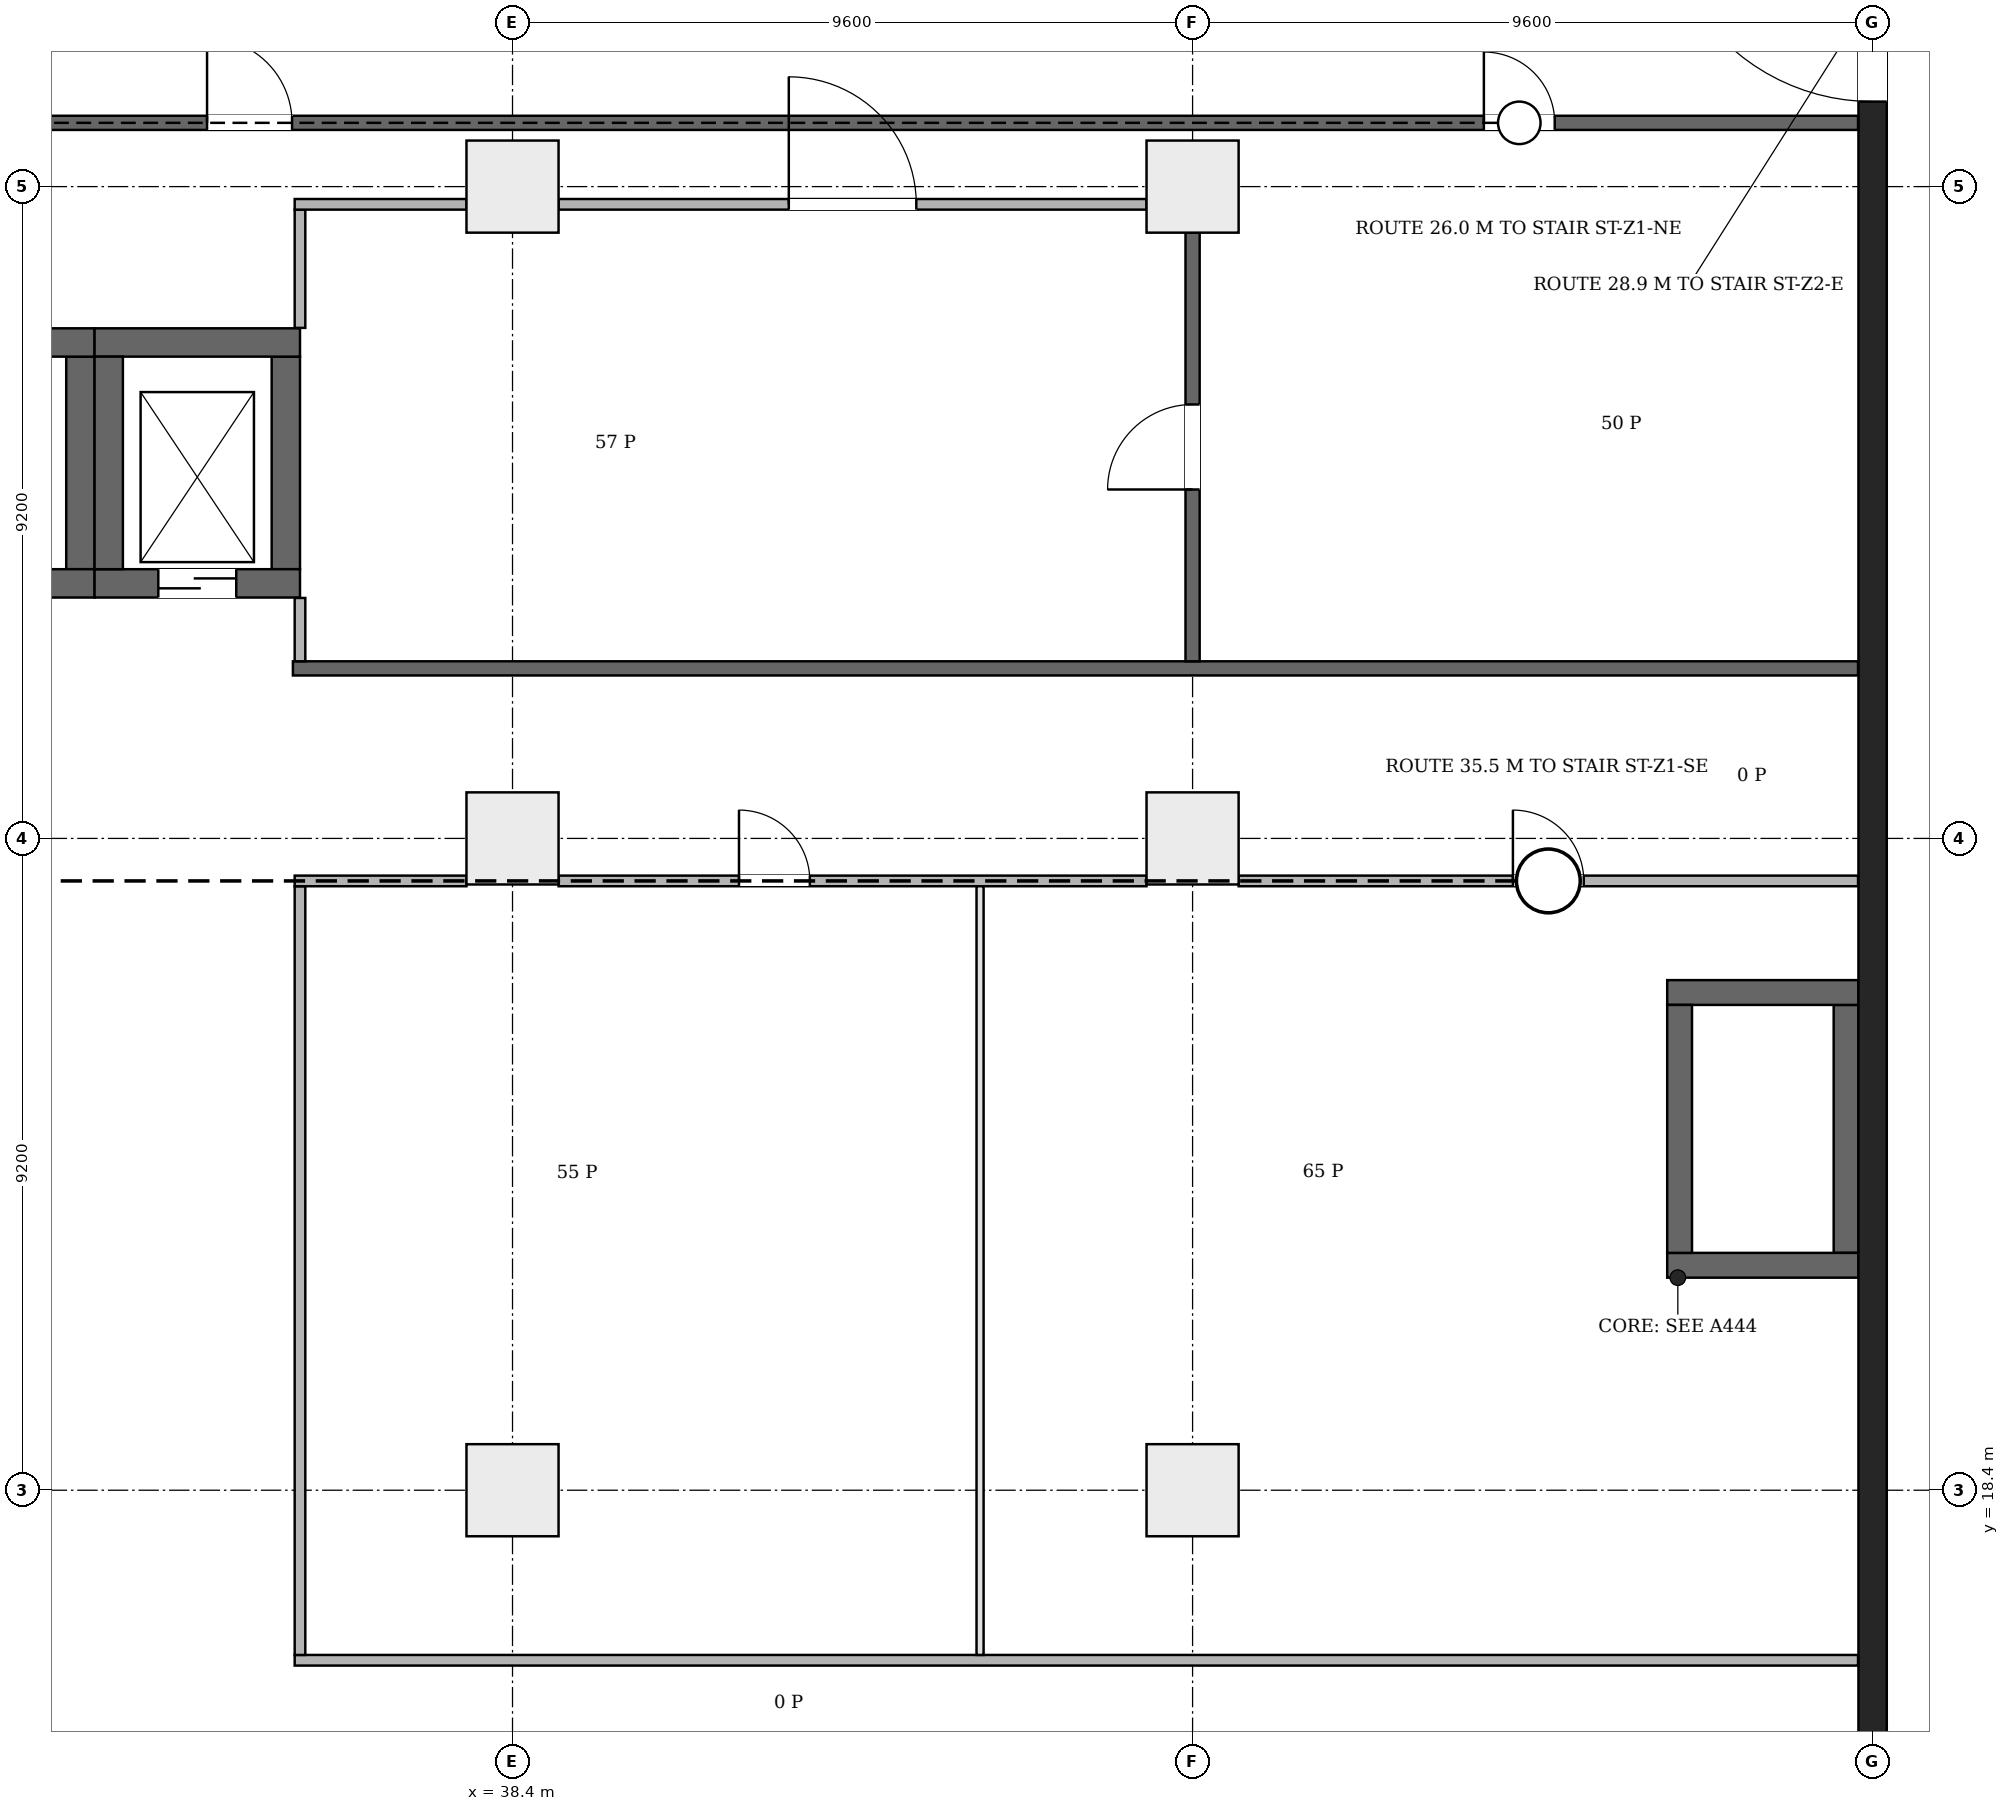
"""IFC4 building model, lengths in metres.
Left out: names, types, materials, properties, quantities, classifications, styles, units other than length and angle.
Written with IfcOpenShell. Run it as: python <this file> out.ifc"""

import sys

from ifc_helpers import new_model, si_unit, direction, frame, frame_2d, origin, origin_2d, place, context, subcontext, project, spatial, rectangle, extrude, element, fill, save


model = new_model("IFC4")
c1 = context("Model", 3, precision=1e-05, world=origin(), true_north=direction((0.0, 1.0)))
c2 = subcontext(c1, "Body", "Model", "MODEL_VIEW")
j1 = project(units=[si_unit("LENGTHUNIT", "METRE"), si_unit("PLANEANGLEUNIT", "RADIAN")], contexts=[c1])
p1 = place(None, origin())
s1 = spatial("IfcSite", under=j1, at=p1, CompositionType="ELEMENT")
p2 = place(p1, origin())
s2 = spatial("IfcBuilding", under=s1, at=p2, CompositionType="ELEMENT")
p3 = place(p2, origin())
s3 = spatial("IfcBuildingStorey", under=s2, at=p3, CompositionType="ELEMENT", Elevation=0.0)
p4 = place(p3, frame((57.6, -0.2, 0.0), z_axis=(0.0, 0.0, 1.0), x_axis=(0.0, 1.0, 0.0)))
e1 = element("IfcWall", 1, at=p4, inside=s3, PredefinedType="SHEAR", context=c2, shape_type="SweptSolid", body=[
    extrude(rectangle(XDim=46.88, YDim=0.4, at=frame_2d((23.44, 0.0))), origin(), (0.0, 0.0, 1.0), 6.5),
])
p5 = place(p4, frame((11.65, 0.0, 0.0)))
e2 = element("IfcOpeningElement", 2, at=p5, cuts=e1, PredefinedType="OPENING", context=c2, shape_type="SweptSolid", body=[
    extrude(rectangle(XDim=3.0, YDim=2.4, at=frame_2d((1.5, 1.2))), frame((0.0, 0.21, 0.0), z_axis=(0.0, -1.0, 0.0), x_axis=(1.0, 0.0, 0.0)), (0.0, 0.0, 1.0), 0.42),
])
p6 = place(p4, frame((38.2, 0.0, 0.0)))
e3 = element("IfcOpeningElement", 3, at=p6, cuts=e1, PredefinedType="OPENING", context=c2, shape_type="SweptSolid", body=[
    extrude(rectangle(XDim=3.0, YDim=2.4, at=frame_2d((1.5, 1.2))), frame((0.0, 0.21, 0.0), z_axis=(0.0, -1.0, 0.0), x_axis=(1.0, 0.0, 0.0)), (0.0, 0.0, 1.0), 0.42),
])
for number, where, z_axis, x_axis in (
    (4, (54.7, 21.575, 0.0), (0.0, 0.0, 1.0), (1.0, 0.0, 0.0)),
    (5, (54.7, 25.425, 0.0), (0.0, 0.0, 1.0), (1.0, 0.0, 0.0)),
):
    element("IfcWall", number, at=place(p3, frame(where, z_axis=z_axis, x_axis=x_axis)), inside=s3, PredefinedType="SHEAR", context=c2, shape_type="SweptSolid", body=[
        extrude(rectangle(XDim=2.7, YDim=0.35, at=frame_2d((1.35, 0.0))), origin(), (0.0, 0.0, 1.0), 6.5),
    ])
for number, where, z_axis, x_axis in (
    (6, (54.875, 21.75, 0.0), (0.0, 0.0, 1.0), (0.0, 1.0, 0.0)),
    (7, (57.225, 21.75, 0.0), (0.0, 0.0, 1.0), (0.0, 1.0, 0.0)),
):
    element("IfcWall", number, at=place(p3, frame(where, z_axis=z_axis, x_axis=x_axis)), inside=s3, PredefinedType="SHEAR", context=c2, shape_type="SweptSolid", body=[
        extrude(rectangle(XDim=3.5, YDim=0.35, at=frame_2d((1.75, 0.0))), origin(), (0.0, 0.0, 1.0), 6.5),
    ])
p7 = place(p3, frame((29.6, 31.2, 0.0), z_axis=(0.0, 0.0, 1.0), x_axis=(1.0, 0.0, 0.0)))
e8 = element("IfcWall", 8, at=p7, inside=s3, PredefinedType="SHEAR", context=c2, shape_type="SweptSolid", body=[
    extrude(rectangle(XDim=2.9, YDim=0.4, at=frame_2d((1.45, 0.0))), origin(), (0.0, 0.0, 1.0), 6.5),
])
p8 = place(p7, frame((0.9, 0.0, 0.0)))
e9 = element("IfcOpeningElement", 9, at=p8, cuts=e8, PredefinedType="OPENING", context=c2, shape_type="SweptSolid", body=[
    extrude(rectangle(XDim=1.1, YDim=2.1, at=frame_2d((0.55, 1.05))), frame((0.0, 0.21, 0.0), z_axis=(0.0, -1.0, 0.0), x_axis=(1.0, 0.0, 0.0)), (0.0, 0.0, 1.0), 0.42),
])
p9 = place(p3, frame((29.6, 34.6, 0.0), z_axis=(0.0, 0.0, 1.0), x_axis=(1.0, 0.0, 0.0)))
e10 = element("IfcWall", 10, at=p9, inside=s3, PredefinedType="SHEAR", context=c2, shape_type="SweptSolid", body=[
    extrude(rectangle(XDim=2.9, YDim=0.4, at=frame_2d((1.45, 0.0))), origin(), (0.0, 0.0, 1.0), 6.5),
])
p10 = place(p3, frame((32.3, 31.4, 0.0), z_axis=(0.0, 0.0, 1.0), x_axis=(0.0, 1.0, 0.0)))
e11 = element("IfcWall", 11, at=p10, inside=s3, PredefinedType="SHEAR", context=c2, shape_type="SweptSolid", body=[
    extrude(rectangle(XDim=3.0, YDim=0.4, at=frame_2d((1.5, 0.0))), origin(), (0.0, 0.0, 1.0), 6.5),
])
p11 = place(p3, frame((32.5, 31.2, 0.0), z_axis=(0.0, 0.0, 1.0), x_axis=(1.0, 0.0, 0.0)))
e12 = element("IfcWall", 12, at=p11, inside=s3, PredefinedType="SHEAR", context=c2, shape_type="SweptSolid", body=[
    extrude(rectangle(XDim=2.9, YDim=0.4, at=frame_2d((1.45, 0.0))), origin(), (0.0, 0.0, 1.0), 6.5),
])
p12 = place(p11, frame((0.9, 0.0, 0.0)))
e13 = element("IfcOpeningElement", 13, at=p12, cuts=e12, PredefinedType="OPENING", context=c2, shape_type="SweptSolid", body=[
    extrude(rectangle(XDim=1.1, YDim=2.1, at=frame_2d((0.55, 1.05))), frame((0.0, 0.21, 0.0), z_axis=(0.0, -1.0, 0.0), x_axis=(1.0, 0.0, 0.0)), (0.0, 0.0, 1.0), 0.42),
])
p13 = place(p3, frame((32.5, 34.6, 0.0), z_axis=(0.0, 0.0, 1.0), x_axis=(1.0, 0.0, 0.0)))
e14 = element("IfcWall", 14, at=p13, inside=s3, PredefinedType="SHEAR", context=c2, shape_type="SweptSolid", body=[
    extrude(rectangle(XDim=2.9, YDim=0.4, at=frame_2d((1.45, 0.0))), origin(), (0.0, 0.0, 1.0), 6.5),
])
for number, where, z_axis, x_axis in (
    (15, (32.7, 31.4, 0.0), (0.0, 0.0, 1.0), (0.0, 1.0, 0.0)),
    (16, (35.2, 31.4, 0.0), (0.0, 0.0, 1.0), (0.0, 1.0, 0.0)),
):
    element("IfcWall", number, at=place(p3, frame(where, z_axis=z_axis, x_axis=x_axis)), inside=s3, PredefinedType="SHEAR", context=c2, shape_type="SweptSolid", body=[
        extrude(rectangle(XDim=3.0, YDim=0.4, at=frame_2d((1.5, 0.0))), origin(), (0.0, 0.0, 1.0), 6.5),
    ])
for number, where, z_axis, x_axis in (
    (17, (38.4, 18.4, 0.0), (0.0, 0.0, 1.0), (1.0, 0.0, 0.0)),
    (18, (48.0, 18.4, 0.0), (0.0, 0.0, 1.0), (1.0, 0.0, 0.0)),
    (19, (38.4, 27.6, 0.0), (0.0, 0.0, 1.0), (1.0, 0.0, 0.0)),
    (20, (48.0, 27.6, 0.0), (0.0, 0.0, 1.0), (1.0, 0.0, 0.0)),
    (21, (38.4, 36.8, 0.0), (0.0, 0.0, 1.0), (1.0, 0.0, 0.0)),
    (22, (48.0, 36.8, 0.0), (0.0, 0.0, 1.0), (1.0, 0.0, 0.0)),
):
    element("IfcColumn", number, at=place(p3, frame(where, z_axis=z_axis, x_axis=x_axis)), inside=s3, PredefinedType="COLUMN", context=c2, shape_type="SweptSolid", body=[
        extrude(rectangle(XDim=1.3, YDim=1.3, at=origin_2d()), origin(), (0.0, 0.0, 1.0), 6.5),
    ])
p14 = place(p3, frame((28.006, 37.7, 0.0), z_axis=(0.0, 0.0, 1.0), x_axis=(1.0, 0.0, 0.0)))
e23 = element("IfcWall", 23, at=p14, inside=s3, PredefinedType="PARTITIONING", context=c2, shape_type="SweptSolid", body=[
    extrude(rectangle(XDim=29.388, YDim=0.2, at=frame_2d((14.694, 0.0))), origin(), (0.0, 0.0, 1.0), 6.15),
])
p15 = place(p14, frame((24.106, 0.0, 0.0)))
e24 = element("IfcOpeningElement", 24, at=p15, cuts=e23, PredefinedType="OPENING", context=c2, shape_type="SweptSolid", body=[
    extrude(rectangle(XDim=1.0, YDim=2.1, at=frame_2d((0.5, 1.05))), frame((0.0, 0.11, 0.0), z_axis=(0.0, -1.0, 0.0), x_axis=(1.0, 0.0, 0.0)), (0.0, 0.0, 1.0), 0.22),
])
p16 = place(p14, frame((6.082, 0.0, 0.0)))
e25 = element("IfcOpeningElement", 25, at=p16, cuts=e23, PredefinedType="OPENING", context=c2, shape_type="SweptSolid", body=[
    extrude(rectangle(XDim=1.2, YDim=2.1, at=frame_2d((0.6, 1.05))), frame((0.0, 0.11, 0.0), z_axis=(0.0, -1.0, 0.0), x_axis=(1.0, 0.0, 0.0)), (0.0, 0.0, 1.0), 0.22),
])
p17 = place(p3, frame((35.3, 30.0, 0.0), z_axis=(0.0, 0.0, 1.0), x_axis=(1.0, 0.0, 0.0)))
e26 = element("IfcWall", 26, at=p17, inside=s3, PredefinedType="PARTITIONING", context=c2, shape_type="SweptSolid", body=[
    extrude(rectangle(XDim=22.094, YDim=0.2, at=frame_2d((11.047, 0.0))), origin(), (0.0, 0.0, 1.0), 6.15),
])
p18 = place(p3, frame((35.325, 16.0, 0.0), z_axis=(0.0, 0.0, 1.0), x_axis=(1.0, 0.0, 0.0)))
e27 = element("IfcWall", 27, at=p18, inside=s3, PredefinedType="PARTITIONING", context=c2, shape_type="SweptSolid", body=[
    extrude(rectangle(XDim=22.069, YDim=0.15, at=frame_2d((11.035, 0.0))), origin(), (0.0, 0.0, 1.0), 6.15),
])
p19 = place(p3, frame((35.4, 16.075, 0.0), z_axis=(0.0, 0.0, 1.0), x_axis=(0.0, 1.0, 0.0)))
e28 = element("IfcWall", 28, at=p19, inside=s3, PredefinedType="PARTITIONING", context=c2, shape_type="SweptSolid", body=[
    extrude(rectangle(XDim=10.85, YDim=0.15, at=frame_2d((5.425, 0.0))), origin(), (0.0, 0.0, 1.0), 6.15),
])
p20 = place(p3, frame((35.325, 27.0, 0.0), z_axis=(0.0, 0.0, 1.0), x_axis=(1.0, 0.0, 0.0)))
e29 = element("IfcWall", 29, at=p20, inside=s3, PredefinedType="PARTITIONING", context=c2, shape_type="SweptSolid", body=[
    extrude(rectangle(XDim=2.425, YDim=0.15, at=frame_2d((1.212, 0.0))), origin(), (0.0, 0.0, 1.0), 6.15),
])
p21 = place(p3, frame((35.4, 30.1, 0.0), z_axis=(0.0, 0.0, 1.0), x_axis=(0.0, 1.0, 0.0)))
e30 = element("IfcWall", 30, at=p21, inside=s3, PredefinedType="PARTITIONING", context=c2, shape_type="SweptSolid", body=[
    extrude(rectangle(XDim=0.894, YDim=0.15, at=frame_2d((0.447, 0.0))), origin(), (0.0, 0.0, 1.0), 6.15),
])
p22 = place(p3, frame((35.4, 34.806, 0.0), z_axis=(0.0, 0.0, 1.0), x_axis=(0.0, 1.0, 0.0)))
e31 = element("IfcWall", 31, at=p22, inside=s3, PredefinedType="PARTITIONING", context=c2, shape_type="SweptSolid", body=[
    extrude(rectangle(XDim=1.669, YDim=0.15, at=frame_2d((0.834, 0.0))), origin(), (0.0, 0.0, 1.0), 6.15),
])
p23 = place(p3, frame((35.325, 36.55, 0.0), z_axis=(0.0, 0.0, 1.0), x_axis=(1.0, 0.0, 0.0)))
e32 = element("IfcWall", 32, at=p23, inside=s3, PredefinedType="PARTITIONING", context=c2, shape_type="SweptSolid", body=[
    extrude(rectangle(XDim=2.425, YDim=0.15, at=frame_2d((1.212, 0.0))), origin(), (0.0, 0.0, 1.0), 5.75),
])
p24 = place(p3, frame((39.05, 27.0, 0.0), z_axis=(0.0, 0.0, 1.0), x_axis=(1.0, 0.0, 0.0)))
e33 = element("IfcWall", 33, at=p24, inside=s3, PredefinedType="PARTITIONING", context=c2, shape_type="SweptSolid", body=[
    extrude(rectangle(XDim=8.3, YDim=0.15, at=frame_2d((4.15, 0.0))), origin(), (0.0, 0.0, 1.0), 6.15),
])
p25 = place(p24, frame((2.547, 0.0, 0.0)))
e34 = element("IfcOpeningElement", 34, at=p25, cuts=e33, PredefinedType="OPENING", context=c2, shape_type="SweptSolid", body=[
    extrude(rectangle(XDim=1.0, YDim=2.1, at=frame_2d((0.5, 1.05))), frame((0.0, 0.085, 0.0), z_axis=(0.0, -1.0, 0.0), x_axis=(1.0, 0.0, 0.0)), (0.0, 0.0, 1.0), 0.17),
])
p26 = place(p3, frame((39.05, 36.55, 0.0), z_axis=(0.0, 0.0, 1.0), x_axis=(1.0, 0.0, 0.0)))
e35 = element("IfcWall", 35, at=p26, inside=s3, PredefinedType="PARTITIONING", context=c2, shape_type="SweptSolid", body=[
    extrude(rectangle(XDim=8.3, YDim=0.15, at=frame_2d((4.15, 0.0))), origin(), (0.0, 0.0, 1.0), 5.75),
])
p27 = place(p26, frame((3.25, 0.0, 0.0)))
e36 = element("IfcOpeningElement", 36, at=p27, cuts=e35, PredefinedType="OPENING", context=c2, shape_type="SweptSolid", body=[
    extrude(rectangle(XDim=1.8, YDim=2.1, at=frame_2d((0.9, 1.05))), frame((0.0, 0.085, 0.0), z_axis=(0.0, -1.0, 0.0), x_axis=(1.0, 0.0, 0.0)), (0.0, 0.0, 1.0), 0.17),
])
p28 = place(p3, frame((45.0, 16.075, 0.0), z_axis=(0.0, 0.0, 1.0), x_axis=(0.0, 1.0, 0.0)))
e37 = element("IfcWall", 37, at=p28, inside=s3, PredefinedType="PARTITIONING", context=c2, shape_type="SweptSolid", body=[
    extrude(rectangle(XDim=10.85, YDim=0.1, at=frame_2d((5.425, 0.0))), origin(), (0.0, 0.0, 1.0), 6.15),
])
p29 = place(p3, frame((48.0, 30.1, 0.0), z_axis=(0.0, 0.0, 1.0), x_axis=(0.0, 1.0, 0.0)))
e38 = element("IfcWall", 38, at=p29, inside=s3, PredefinedType="PARTITIONING", context=c2, shape_type="SweptSolid", body=[
    extrude(rectangle(XDim=6.05, YDim=0.2, at=frame_2d((3.025, 0.0))), origin(), (0.0, 0.0, 1.0), 5.75),
])
p30 = place(p29, frame((2.425, 0.0, 0.0)))
e39 = element("IfcOpeningElement", 39, at=p30, cuts=e38, PredefinedType="OPENING", context=c2, shape_type="SweptSolid", body=[
    extrude(rectangle(XDim=1.2, YDim=2.1, at=frame_2d((0.6, 1.05))), frame((0.0, 0.11, 0.0), z_axis=(0.0, -1.0, 0.0), x_axis=(1.0, 0.0, 0.0)), (0.0, 0.0, 1.0), 0.22),
])
p31 = place(p3, frame((48.65, 27.0, 0.0), z_axis=(0.0, 0.0, 1.0), x_axis=(1.0, 0.0, 0.0)))
e40 = element("IfcWall", 40, at=p31, inside=s3, PredefinedType="PARTITIONING", context=c2, shape_type="SweptSolid", body=[
    extrude(rectangle(XDim=8.744, YDim=0.15, at=frame_2d((4.372, 0.0))), origin(), (0.0, 0.0, 1.0), 6.15),
])
p32 = place(p31, frame((3.872, 0.0, 0.0)))
e41 = element("IfcOpeningElement", 41, at=p32, cuts=e40, PredefinedType="OPENING", context=c2, shape_type="SweptSolid", body=[
    extrude(rectangle(XDim=1.0, YDim=2.1, at=frame_2d((0.5, 1.05))), frame((0.0, 0.085, 0.0), z_axis=(0.0, -1.0, 0.0), x_axis=(1.0, 0.0, 0.0)), (0.0, 0.0, 1.0), 0.17),
])
p33 = place(p6, frame((3.0, 0.0, 0.0), z_axis=(0.0, 0.0, 1.0), x_axis=(-1.0, 0.0, 0.0)))
e42 = element("IfcDoor", 42, at=p33, inside=s3, OperationType="DOUBLE_DOOR_SINGLE_SWING", PredefinedType="DOOR", context=c2, shape_type="SweptSolid", body=[
    extrude(rectangle(XDim=3.0, YDim=2.4, at=frame_2d((1.5, 1.2))), frame((0.0, 0.025, 0.0), z_axis=(0.0, -1.0, 0.0), x_axis=(1.0, 0.0, 0.0)), (0.0, 0.0, 1.0), 0.05),
])
fill(e3, e42)
p34 = place(p12, origin())
e43 = element("IfcDoor", 43, at=p34, inside=s3, OperationType="DOUBLE_DOOR_SLIDING", PredefinedType="DOOR", context=c2, shape_type="SweptSolid", body=[
    extrude(rectangle(XDim=1.1, YDim=2.1, at=frame_2d((0.55, 1.05))), frame((0.0, 0.025, 0.0), z_axis=(0.0, -1.0, 0.0), x_axis=(1.0, 0.0, 0.0)), (0.0, 0.0, 1.0), 0.05),
])
fill(e13, e43)
p35 = place(p25, origin())
e44 = element("IfcDoor", 44, at=p35, inside=s3, OperationType="SINGLE_SWING_LEFT", PredefinedType="DOOR", context=c2, shape_type="SweptSolid", body=[
    extrude(rectangle(XDim=1.0, YDim=2.1, at=frame_2d((0.5, 1.05))), frame((0.0, 0.025, 0.0), z_axis=(0.0, -1.0, 0.0), x_axis=(1.0, 0.0, 0.0)), (0.0, 0.0, 1.0), 0.05),
])
fill(e34, e44)
p36 = place(p32, origin())
e45 = element("IfcDoor", 45, at=p36, inside=s3, OperationType="SINGLE_SWING_LEFT", PredefinedType="DOOR", context=c2, shape_type="SweptSolid", body=[
    extrude(rectangle(XDim=1.0, YDim=2.1, at=frame_2d((0.5, 1.05))), frame((0.0, 0.025, 0.0), z_axis=(0.0, -1.0, 0.0), x_axis=(1.0, 0.0, 0.0)), (0.0, 0.0, 1.0), 0.05),
])
fill(e41, e45)
p37 = place(p27, origin())
e46 = element("IfcDoor", 46, at=p37, inside=s3, OperationType="DOUBLE_DOOR_SINGLE_SWING", PredefinedType="DOOR", context=c2, shape_type="SweptSolid", body=[
    extrude(rectangle(XDim=1.8, YDim=2.1, at=frame_2d((0.9, 1.05))), frame((0.0, 0.025, 0.0), z_axis=(0.0, -1.0, 0.0), x_axis=(1.0, 0.0, 0.0)), (0.0, 0.0, 1.0), 0.05),
])
fill(e36, e46)
p38 = place(p30, origin())
e47 = element("IfcDoor", 47, at=p38, inside=s3, OperationType="SINGLE_SWING_RIGHT", PredefinedType="DOOR", context=c2, shape_type="SweptSolid", body=[
    extrude(rectangle(XDim=1.2, YDim=2.1, at=frame_2d((0.6, 1.05))), frame((0.0, 0.025, 0.0), z_axis=(0.0, -1.0, 0.0), x_axis=(1.0, 0.0, 0.0)), (0.0, 0.0, 1.0), 0.05),
])
fill(e39, e47)
p39 = place(p15, origin())
e48 = element("IfcDoor", 48, at=p39, inside=s3, OperationType="SINGLE_SWING_RIGHT", PredefinedType="DOOR", context=c2, shape_type="SweptSolid", body=[
    extrude(rectangle(XDim=1.0, YDim=2.1, at=frame_2d((0.5, 1.05))), frame((0.0, 0.025, 0.0), z_axis=(0.0, -1.0, 0.0), x_axis=(1.0, 0.0, 0.0)), (0.0, 0.0, 1.0), 0.05),
])
fill(e24, e48)
p40 = place(p16, origin())
e49 = element("IfcDoor", 49, at=p40, inside=s3, OperationType="SINGLE_SWING_LEFT", PredefinedType="DOOR", context=c2, shape_type="SweptSolid", body=[
    extrude(rectangle(XDim=1.2, YDim=2.1, at=frame_2d((0.6, 1.05))), frame((0.0, 0.025, 0.0), z_axis=(0.0, -1.0, 0.0), x_axis=(1.0, 0.0, 0.0)), (0.0, 0.0, 1.0), 0.05),
])
fill(e25, e49)
save(model, sys.argv[1])
